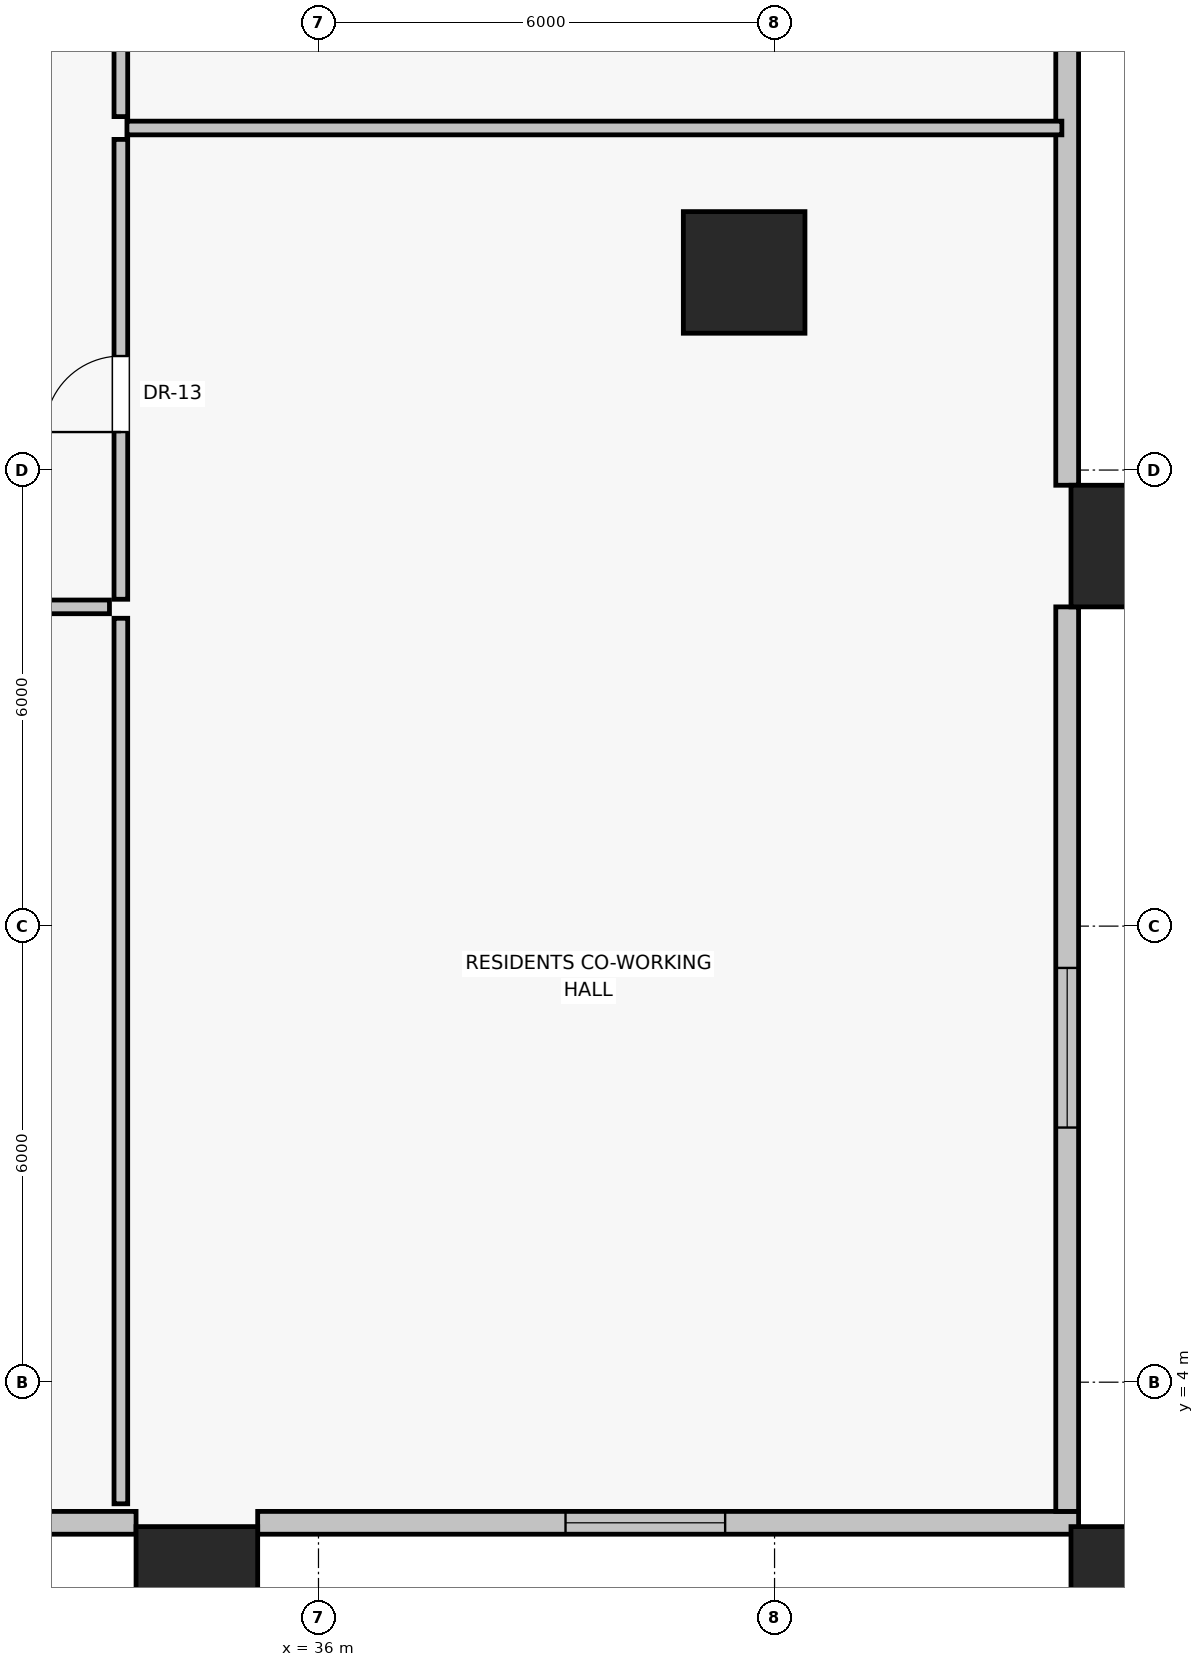
"""IFC4 building model, lengths in metres.
Left out: names, types, materials, properties, quantities, classifications, styles, units other than length and angle.
Written with IfcOpenShell. Run it as: python <this file> out.ifc"""

import sys

from ifc_helpers import new_model, si_unit, direction, frame, frame_2d, origin, origin_2d, place, context, subcontext, project, spatial, rectangle, extrude, source, transform, mapped, element, fill, save


model = new_model("IFC4")
c1 = context("Model", 3, precision=1e-05, world=origin(), true_north=direction((0.0, 1.0)))
c2 = subcontext(c1, "Body", "Model", "MODEL_VIEW")
j1 = project(units=[si_unit("LENGTHUNIT", "METRE"), si_unit("PLANEANGLEUNIT", "RADIAN")], contexts=[c1])
p1 = place(None, origin())
s1 = spatial("IfcSite", under=j1, at=p1, CompositionType="ELEMENT")
p2 = place(p1, origin())
s2 = spatial("IfcBuilding", under=s1, at=p2, CompositionType="ELEMENT")
p3 = place(p2, frame((0.0, 0.0, 14.0)))
s3 = spatial("IfcBuildingStorey", under=s2, at=p3, CompositionType="ELEMENT", Elevation=14.0)
for number, where, z_axis, x_axis in (
    (1, (34.4, 1.3, 0.0), (0.0, 0.0, 1.0), (1.0, 0.0, 0.0)),
    (2, (46.7, 1.3, 0.0), (0.0, 0.0, 1.0), (1.0, 0.0, 0.0)),
    (3, (46.7, 15.0, 0.0), (0.0, 0.0, 1.0), (1.0, 0.0, 0.0)),
    (4, (41.6, 18.6, 0.0), (0.0, 0.0, 1.0), (1.0, 0.0, 0.0)),
):
    element("IfcColumn", number, at=place(p3, frame(where, z_axis=z_axis, x_axis=x_axis)), inside=s3, PredefinedType="COLUMN", context=c2, shape_type="SweptSolid", body=[
        extrude(rectangle(XDim=1.6, YDim=1.6, at=origin_2d()), origin(), (0.0, 0.0, 1.0), 4.4),
    ])
p4 = place(p3, frame((24.8, 2.15, 0.0), z_axis=(0.0, 0.0, 1.0), x_axis=(1.0, 0.0, 0.0)))
e5 = element("IfcWall", 5, at=p4, inside=s3, PredefinedType="SOLIDWALL", context=c2, shape_type="SweptSolid", body=[
    extrude(rectangle(XDim=8.8, YDim=0.3, at=frame_2d((4.4, 0.0))), origin(), (0.0, 0.0, 1.0), 3.0),
])
p5 = place(p4, frame((3.35, 0.0, 0.85)))
e6 = element("IfcOpeningElement", 6, at=p5, cuts=e5, PredefinedType="OPENING", context=c2, shape_type="SweptSolid", body=[
    extrude(rectangle(XDim=2.1, YDim=1.75, at=frame_2d((1.05, 0.875))), frame((0.0, 0.16, 0.0), z_axis=(0.0, -1.0, 0.0), x_axis=(1.0, 0.0, 0.0)), (0.0, 0.0, 1.0), 0.32),
])
p6 = place(p3, frame((35.2, 2.15, 0.0), z_axis=(0.0, 0.0, 1.0), x_axis=(1.0, 0.0, 0.0)))
e7 = element("IfcWall", 7, at=p6, inside=s3, PredefinedType="SOLIDWALL", context=c2, shape_type="SweptSolid", body=[
    extrude(rectangle(XDim=10.8, YDim=0.3, at=frame_2d((5.4, 0.0))), origin(), (0.0, 0.0, 1.0), 3.0),
])
p7 = place(p6, frame((4.05, 0.0, 0.85)))
e8 = element("IfcOpeningElement", 8, at=p7, cuts=e7, PredefinedType="OPENING", context=c2, shape_type="SweptSolid", body=[
    extrude(rectangle(XDim=2.1, YDim=1.75, at=frame_2d((1.05, 0.875))), frame((0.0, 0.16, 0.0), z_axis=(0.0, -1.0, 0.0), x_axis=(1.0, 0.0, 0.0)), (0.0, 0.0, 1.0), 0.32),
])
p8 = place(p3, frame((45.85, 2.3, 0.0), z_axis=(0.0, 0.0, 1.0), x_axis=(0.0, 1.0, 0.0)))
e9 = element("IfcWall", 9, at=p8, inside=s3, PredefinedType="SOLIDWALL", context=c2, shape_type="SweptSolid", body=[
    extrude(rectangle(XDim=11.9, YDim=0.3, at=frame_2d((5.95, 0.0))), origin(), (0.0, 0.0, 1.0), 3.0),
])
p9 = place(p8, frame((5.05, 0.0, 0.85)))
e10 = element("IfcOpeningElement", 10, at=p9, cuts=e9, PredefinedType="OPENING", context=c2, shape_type="SweptSolid", body=[
    extrude(rectangle(XDim=2.1, YDim=1.75, at=frame_2d((1.05, 0.875))), frame((0.0, 0.16, 0.0), z_axis=(0.0, -1.0, 0.0), x_axis=(1.0, 0.0, 0.0)), (0.0, 0.0, 1.0), 0.32),
])
p10 = place(p3, frame((45.85, 15.8, 0.0), z_axis=(0.0, 0.0, 1.0), x_axis=(0.0, 1.0, 0.0)))
e11 = element("IfcWall", 11, at=p10, inside=s3, PredefinedType="SOLIDWALL", context=c2, shape_type="SweptSolid", body=[
    extrude(rectangle(XDim=16.4, YDim=0.3, at=frame_2d((8.2, 0.0))), origin(), (0.0, 0.0, 1.0), 3.0),
])
p11 = place(p10, frame((7.15, 0.0, 0.85)))
e12 = element("IfcOpeningElement", 12, at=p11, cuts=e11, PredefinedType="OPENING", context=c2, shape_type="SweptSolid", body=[
    extrude(rectangle(XDim=2.1, YDim=1.75, at=frame_2d((1.05, 0.875))), frame((0.0, 0.16, 0.0), z_axis=(0.0, -1.0, 0.0), x_axis=(1.0, 0.0, 0.0)), (0.0, 0.0, 1.0), 0.32),
])
p12 = place(p3, frame((22.65, 14.2, 0.0), z_axis=(0.0, 0.0, 1.0), x_axis=(1.0, 0.0, 0.0)))
e13 = element("IfcWall", 13, at=p12, inside=s3, PredefinedType="PARTITIONING", context=c2, shape_type="SweptSolid", body=[
    extrude(rectangle(XDim=10.6, YDim=0.18, at=frame_2d((5.3, 0.0))), origin(), (0.0, 0.0, 1.0), 4.1),
])
p13 = place(p12, frame((2.5, 0.0, 0.0)))
e14 = element("IfcOpeningElement", 14, at=p13, cuts=e13, PredefinedType="OPENING", context=c2, shape_type="SweptSolid", body=[
    extrude(rectangle(XDim=1.0, YDim=2.01, at=frame_2d((0.5, 1.005))), frame((0.0, 0.1, 0.0), z_axis=(0.0, -1.0, 0.0), x_axis=(1.0, 0.0, 0.0)), (0.0, 0.0, 1.0), 0.2),
])
p14 = place(p3, frame((33.4, 2.4, 0.0), z_axis=(0.0, 0.0, 1.0), x_axis=(0.0, 1.0, 0.0)))
e15 = element("IfcWall", 15, at=p14, inside=s3, PredefinedType="PARTITIONING", context=c2, shape_type="SweptSolid", body=[
    extrude(rectangle(XDim=11.65, YDim=0.18, at=frame_2d((5.825, 0.0))), origin(), (0.0, 0.0, 1.0), 4.1),
])
p15 = place(p3, frame((33.4, 14.3, 0.0), z_axis=(0.0, 0.0, 1.0), x_axis=(0.0, 1.0, 0.0)))
e16 = element("IfcWall", 16, at=p15, inside=s3, PredefinedType="PARTITIONING", context=c2, shape_type="SweptSolid", body=[
    extrude(rectangle(XDim=6.05, YDim=0.18, at=frame_2d((3.025, 0.0))), origin(), (0.0, 0.0, 1.0), 4.1),
])
p16 = place(p15, frame((2.2, 0.0, 0.0)))
e17 = element("IfcOpeningElement", 17, at=p16, cuts=e16, PredefinedType="OPENING", context=c2, shape_type="SweptSolid", body=[
    extrude(rectangle(XDim=1.0, YDim=2.01, at=frame_2d((0.5, 1.005))), frame((0.0, 0.1, 0.0), z_axis=(0.0, -1.0, 0.0), x_axis=(1.0, 0.0, 0.0)), (0.0, 0.0, 1.0), 0.2),
])
p17 = place(p3, frame((33.4, 20.65, 0.0), z_axis=(0.0, 0.0, 1.0), x_axis=(0.0, 1.0, 0.0)))
e18 = element("IfcWall", 18, at=p17, inside=s3, PredefinedType="PARTITIONING", context=c2, shape_type="SweptSolid", body=[
    extrude(rectangle(XDim=12.85, YDim=0.18, at=frame_2d((6.425, 0.0))), origin(), (0.0, 0.0, 1.0), 4.1),
])
p18 = place(p17, frame((2.2, 0.0, 0.0)))
e19 = element("IfcOpeningElement", 19, at=p18, cuts=e18, PredefinedType="OPENING", context=c2, shape_type="SweptSolid", body=[
    extrude(rectangle(XDim=1.0, YDim=2.01, at=frame_2d((0.5, 1.005))), frame((0.0, 0.1, 0.0), z_axis=(0.0, -1.0, 0.0), x_axis=(1.0, 0.0, 0.0)), (0.0, 0.0, 1.0), 0.2),
])
p19 = place(p3, frame((33.48, 20.5, 0.0), z_axis=(0.0, 0.0, 1.0), x_axis=(1.0, 0.0, 0.0)))
e20 = element("IfcWall", 20, at=p19, inside=s3, PredefinedType="PARTITIONING", context=c2, shape_type="SweptSolid", body=[
    extrude(rectangle(XDim=12.3, YDim=0.18, at=frame_2d((6.15, 0.0))), origin(), (0.0, 0.0, 1.0), 4.1),
])
m1 = source(origin(), c2, "Body", "SweptSolid", [
    extrude(rectangle(XDim=2.1, YDim=1.75, at=frame_2d((1.05, 0.875))), frame((0.0, 0.03, 0.0), z_axis=(0.0, -1.0, 0.0), x_axis=(1.0, 0.0, 0.0)), (0.0, 0.0, 1.0), 0.06),
])
p20 = place(p7, origin())
e21 = element("IfcWindow", 21, at=p20, inside=s3, PartitioningType="DOUBLE_PANEL_VERTICAL", PredefinedType="WINDOW", context=c2, shape_type="MappedRepresentation", body=[
    mapped(m1, transform((0.0, 0.0, 0.0), scale=1.0)),
])
fill(e8, e21)
p21 = place(p9, origin())
e22 = element("IfcWindow", 22, at=p21, inside=s3, PartitioningType="DOUBLE_PANEL_VERTICAL", PredefinedType="WINDOW", context=c2, shape_type="MappedRepresentation", body=[
    mapped(m1, transform((0.0, 0.0, 0.0), scale=1.0)),
])
fill(e10, e22)
m2 = source(origin(), c2, "Body", "SweptSolid", [
    extrude(rectangle(XDim=1.0, YDim=2.01, at=frame_2d((0.5, 1.005))), frame((0.0, 0.025, 0.0), z_axis=(0.0, -1.0, 0.0), x_axis=(1.0, 0.0, 0.0)), (0.0, 0.0, 1.0), 0.05),
])
p22 = place(p16, origin())
e23 = element("IfcDoor", 23, at=p22, inside=s3, OperationType="SINGLE_SWING_LEFT", PredefinedType="DOOR", context=c2, shape_type="MappedRepresentation", body=[
    mapped(m2, transform((0.0, 0.0, 0.0), scale=1.0)),
])
fill(e17, e23)
save(model, sys.argv[1])
